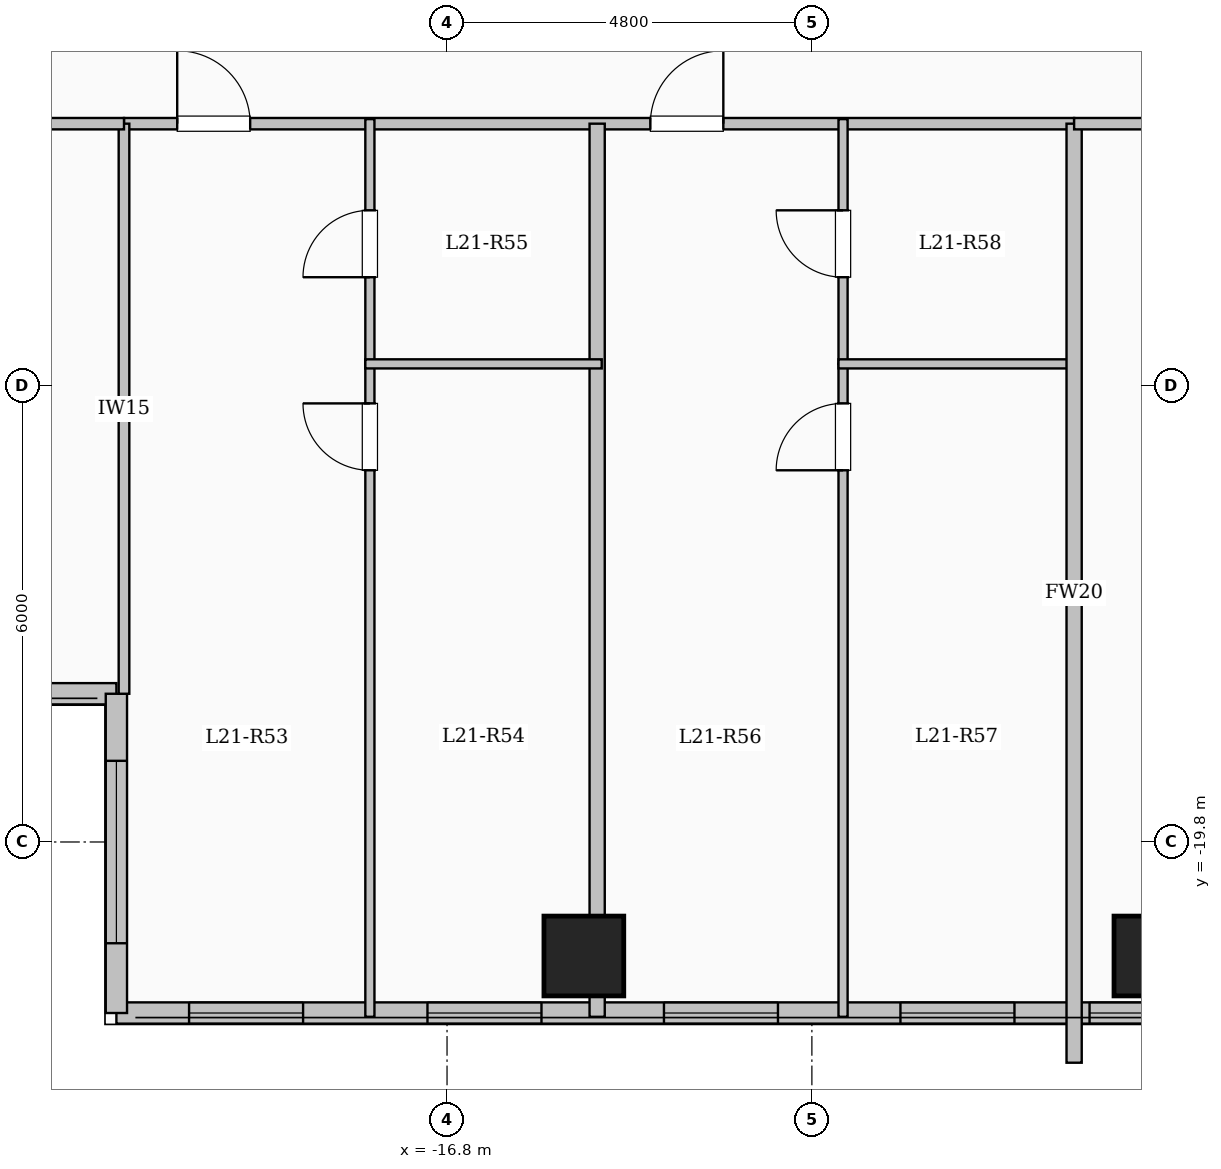
"""IFC4 building model, lengths in metres.
Left out: names, types, materials, properties, quantities, classifications, styles, units other than length and angle.
Written with IfcOpenShell. Run it as: python <this file> out.ifc"""

import sys

from ifc_helpers import new_model, si_unit, direction, frame, frame_2d, origin, origin_2d, place, context, subcontext, project, spatial, rectangle, extrude, element, fill, save


model = new_model("IFC4")
c1 = context("Model", 3, precision=1e-05, world=origin(), true_north=direction((0.0, 1.0)))
c2 = subcontext(c1, "Body", "Model", "MODEL_VIEW")
j1 = project(units=[si_unit("LENGTHUNIT", "METRE"), si_unit("PLANEANGLEUNIT", "RADIAN")], contexts=[c1])
p1 = place(None, origin())
s1 = spatial("IfcSite", under=j1, at=p1, CompositionType="ELEMENT")
p2 = place(p1, origin())
s2 = spatial("IfcBuilding", under=s1, at=p2, CompositionType="ELEMENT")
p3 = place(p2, frame((0.0, 0.0, 81.65)))
s3 = spatial("IfcBuildingStorey", under=s2, at=p3, CompositionType="ELEMENT", Elevation=81.65)
for number, where, z_axis, x_axis in (
    (1, (-15.0, -21.3, 0.0), (0.0, 0.0, 1.0), (1.0, 0.0, 0.0)),
    (2, (-7.5, -21.3, 0.0), (0.0, 0.0, 1.0), (1.0, 0.0, 0.0)),
):
    element("IfcColumn", number, at=place(p3, frame(where, z_axis=z_axis, x_axis=x_axis)), inside=s3, PredefinedType="COLUMN", context=c2, shape_type="SweptSolid", body=[
        extrude(rectangle(XDim=1.05, YDim=1.05, at=origin_2d()), origin(), (0.0, 0.0, 1.0), 3.35),
    ])
p4 = place(p3, frame((-21.15, -17.85, 0.0), z_axis=(0.0, 0.0, 1.0), x_axis=(-1.0, 0.0, 0.0)))
e3 = element("IfcWall", 3, at=p4, inside=s3, PredefinedType="SOLIDWALL", context=c2, shape_type="SweptSolid", body=[
    extrude(rectangle(XDim=5.7, YDim=0.28, at=frame_2d((2.85, 0.0))), origin(), (0.0, 0.0, 1.0), 3.1),
])
p5 = place(p4, frame((1.625, 0.0, 0.9)))
e4 = element("IfcOpeningElement", 4, at=p5, cuts=e3, PredefinedType="OPENING", context=c2, shape_type="SweptSolid", body=[
    extrude(rectangle(XDim=2.4, YDim=1.8, at=frame_2d((1.2, 0.9))), frame((0.0, 0.15, 0.0), z_axis=(0.0, -1.0, 0.0), x_axis=(1.0, 0.0, 0.0)), (0.0, 0.0, 1.0), 0.3),
])
p6 = place(p3, frame((-7.35, -22.05, 0.0), z_axis=(0.0, 0.0, 1.0), x_axis=(-1.0, 0.0, 0.0)))
e5 = element("IfcWall", 5, at=p6, inside=s3, PredefinedType="SOLIDWALL", context=c2, shape_type="SweptSolid", body=[
    extrude(rectangle(XDim=13.8, YDim=0.28, at=frame_2d((6.9, 0.0))), origin(), (0.0, 0.0, 1.0), 3.1),
])
p7 = place(p6, frame((0.147, 0.0, 0.95)))
e6 = element("IfcOpeningElement", 6, at=p7, cuts=e5, PredefinedType="OPENING", context=c2, shape_type="SweptSolid", body=[
    extrude(rectangle(XDim=0.85, YDim=1.5, at=frame_2d((0.425, 0.75))), frame((0.0, 0.15, 0.0), z_axis=(0.0, -1.0, 0.0), x_axis=(1.0, 0.0, 0.0)), (0.0, 0.0, 1.0), 0.3),
])
p8 = place(p6, frame((1.985, 0.0, 0.9)))
e7 = element("IfcOpeningElement", 7, at=p8, cuts=e5, PredefinedType="OPENING", context=c2, shape_type="SweptSolid", body=[
    extrude(rectangle(XDim=1.5, YDim=1.65, at=frame_2d((0.75, 0.825))), frame((0.0, 0.15, 0.0), z_axis=(0.0, -1.0, 0.0), x_axis=(1.0, 0.0, 0.0)), (0.0, 0.0, 1.0), 0.3),
])
p9 = place(p6, frame((5.096, 0.0, 0.9)))
e8 = element("IfcOpeningElement", 8, at=p9, cuts=e5, PredefinedType="OPENING", context=c2, shape_type="SweptSolid", body=[
    extrude(rectangle(XDim=1.5, YDim=1.65, at=frame_2d((0.75, 0.825))), frame((0.0, 0.15, 0.0), z_axis=(0.0, -1.0, 0.0), x_axis=(1.0, 0.0, 0.0)), (0.0, 0.0, 1.0), 0.3),
])
p10 = place(p6, frame((8.208, 0.0, 0.9)))
e9 = element("IfcOpeningElement", 9, at=p10, cuts=e5, PredefinedType="OPENING", context=c2, shape_type="SweptSolid", body=[
    extrude(rectangle(XDim=1.5, YDim=1.65, at=frame_2d((0.75, 0.825))), frame((0.0, 0.15, 0.0), z_axis=(0.0, -1.0, 0.0), x_axis=(1.0, 0.0, 0.0)), (0.0, 0.0, 1.0), 0.3),
])
p11 = place(p6, frame((11.344, 0.0, 0.9)))
e10 = element("IfcOpeningElement", 10, at=p11, cuts=e5, PredefinedType="OPENING", context=c2, shape_type="SweptSolid", body=[
    extrude(rectangle(XDim=1.5, YDim=1.65, at=frame_2d((0.75, 0.825))), frame((0.0, 0.15, 0.0), z_axis=(0.0, -1.0, 0.0), x_axis=(1.0, 0.0, 0.0)), (0.0, 0.0, 1.0), 0.3),
])
p12 = place(p3, frame((-21.15, -22.05, 0.0), z_axis=(0.0, 0.0, 1.0), x_axis=(0.0, 1.0, 0.0)))
e11 = element("IfcWall", 11, at=p12, inside=s3, PredefinedType="SOLIDWALL", context=c2, shape_type="SweptSolid", body=[
    extrude(rectangle(XDim=4.2, YDim=0.28, at=frame_2d((2.1, 0.0))), origin(), (0.0, 0.0, 1.0), 3.1),
])
p13 = place(p12, frame((0.918, 0.0, 0.9)))
e12 = element("IfcOpeningElement", 12, at=p13, cuts=e11, PredefinedType="OPENING", context=c2, shape_type="SweptSolid", body=[
    extrude(rectangle(XDim=2.4, YDim=1.8, at=frame_2d((1.2, 0.9))), frame((0.0, 0.15, 0.0), z_axis=(0.0, -1.0, 0.0), x_axis=(1.0, 0.0, 0.0)), (0.0, 0.0, 1.0), 0.3),
])
p14 = place(p3, frame((-21.05, -10.35, 0.0), z_axis=(0.0, 0.0, 1.0), x_axis=(1.0, 0.0, 0.0)))
e13 = element("IfcWall", 13, at=p14, inside=s3, PredefinedType="PARTITIONING", context=c2, shape_type="SweptSolid", body=[
    extrude(rectangle(XDim=12.5, YDim=0.15, at=frame_2d((6.25, 0.0))), origin(), (0.0, 0.0, 1.0), 3.1),
])
p15 = place(p14, frame((0.7, 0.0, 0.0)))
e14 = element("IfcOpeningElement", 14, at=p15, cuts=e13, PredefinedType="OPENING", context=c2, shape_type="SweptSolid", body=[
    extrude(rectangle(XDim=0.96, YDim=2.15, at=frame_2d((0.48, 1.075))), frame((0.0, 0.085, 0.0), z_axis=(0.0, -1.0, 0.0), x_axis=(1.0, 0.0, 0.0)), (0.0, 0.0, 1.0), 0.17),
])
p16 = place(p14, frame((6.925, 0.0, 0.0)))
e15 = element("IfcOpeningElement", 15, at=p16, cuts=e13, PredefinedType="OPENING", context=c2, shape_type="SweptSolid", body=[
    extrude(rectangle(XDim=0.96, YDim=2.15, at=frame_2d((0.48, 1.075))), frame((0.0, 0.085, 0.0), z_axis=(0.0, -1.0, 0.0), x_axis=(1.0, 0.0, 0.0)), (0.0, 0.0, 1.0), 0.17),
])
p17 = place(p3, frame((-14.825, -22.1, 0.0), z_axis=(0.0, 0.0, 1.0), x_axis=(0.0, 1.0, 0.0)))
e16 = element("IfcWall", 16, at=p17, inside=s3, PredefinedType="SOLIDWALL", context=c2, shape_type="SweptSolid", body=[
    extrude(rectangle(XDim=11.75, YDim=0.2, at=frame_2d((5.875, 0.0))), origin(), (0.0, 0.0, 1.0), 2.435),
])
p18 = place(p3, frame((-17.815, -22.1, 0.0), z_axis=(0.0, 0.0, 1.0), x_axis=(0.0, 1.0, 0.0)))
e17 = element("IfcWall", 17, at=p18, inside=s3, PredefinedType="PARTITIONING", context=c2, shape_type="SweptSolid", body=[
    extrude(rectangle(XDim=8.59, YDim=0.12, at=frame_2d((4.295, 0.0))), origin(), (0.0, 0.0, 1.0), 3.1),
])
p19 = place(p18, frame((7.19, 0.0, 0.0)))
e18 = element("IfcOpeningElement", 18, at=p19, cuts=e17, PredefinedType="OPENING", context=c2, shape_type="SweptSolid", body=[
    extrude(rectangle(XDim=0.88, YDim=2.1, at=frame_2d((0.44, 1.05))), frame((0.0, 0.07, 0.0), z_axis=(0.0, -1.0, 0.0), x_axis=(1.0, 0.0, 0.0)), (0.0, 0.0, 1.0), 0.14),
])
p20 = place(p3, frame((-17.815, -13.51, 0.0), z_axis=(0.0, 0.0, 1.0), x_axis=(0.0, 1.0, 0.0)))
e19 = element("IfcWall", 19, at=p20, inside=s3, PredefinedType="PARTITIONING", context=c2, shape_type="SweptSolid", body=[
    extrude(rectangle(XDim=3.22, YDim=0.12, at=frame_2d((1.61, 0.0))), origin(), (0.0, 0.0, 1.0), 3.1),
])
p21 = place(p20, frame((1.14, 0.0, 0.0)))
e20 = element("IfcOpeningElement", 20, at=p21, cuts=e19, PredefinedType="OPENING", context=c2, shape_type="SweptSolid", body=[
    extrude(rectangle(XDim=0.88, YDim=2.1, at=frame_2d((0.44, 1.05))), frame((0.0, 0.07, 0.0), z_axis=(0.0, -1.0, 0.0), x_axis=(1.0, 0.0, 0.0)), (0.0, 0.0, 1.0), 0.14),
])
p22 = place(p3, frame((-17.875, -13.51, 0.0), z_axis=(0.0, 0.0, 1.0), x_axis=(1.0, 0.0, 0.0)))
e21 = element("IfcWall", 21, at=p22, inside=s3, PredefinedType="PARTITIONING", context=c2, shape_type="SweptSolid", body=[
    extrude(rectangle(XDim=3.11, YDim=0.12, at=frame_2d((1.555, 0.0))), origin(), (0.0, 0.0, 1.0), 3.1),
])
p23 = place(p3, frame((-11.59, -22.1, 0.0), z_axis=(0.0, 0.0, 1.0), x_axis=(0.0, 1.0, 0.0)))
e22 = element("IfcWall", 22, at=p23, inside=s3, PredefinedType="PARTITIONING", context=c2, shape_type="SweptSolid", body=[
    extrude(rectangle(XDim=8.59, YDim=0.12, at=frame_2d((4.295, 0.0))), origin(), (0.0, 0.0, 1.0), 3.1),
])
p24 = place(p23, frame((7.19, 0.0, 0.0)))
e23 = element("IfcOpeningElement", 23, at=p24, cuts=e22, PredefinedType="OPENING", context=c2, shape_type="SweptSolid", body=[
    extrude(rectangle(XDim=0.88, YDim=2.1, at=frame_2d((0.44, 1.05))), frame((0.0, 0.07, 0.0), z_axis=(0.0, -1.0, 0.0), x_axis=(1.0, 0.0, 0.0)), (0.0, 0.0, 1.0), 0.14),
])
p25 = place(p3, frame((-11.59, -13.51, 0.0), z_axis=(0.0, 0.0, 1.0), x_axis=(0.0, 1.0, 0.0)))
e24 = element("IfcWall", 24, at=p25, inside=s3, PredefinedType="PARTITIONING", context=c2, shape_type="SweptSolid", body=[
    extrude(rectangle(XDim=3.22, YDim=0.12, at=frame_2d((1.61, 0.0))), origin(), (0.0, 0.0, 1.0), 3.1),
])
p26 = place(p25, frame((1.14, 0.0, 0.0)))
e25 = element("IfcOpeningElement", 25, at=p26, cuts=e24, PredefinedType="OPENING", context=c2, shape_type="SweptSolid", body=[
    extrude(rectangle(XDim=0.88, YDim=2.1, at=frame_2d((0.44, 1.05))), frame((0.0, 0.07, 0.0), z_axis=(0.0, -1.0, 0.0), x_axis=(1.0, 0.0, 0.0)), (0.0, 0.0, 1.0), 0.14),
])
p27 = place(p3, frame((-11.65, -13.51, 0.0), z_axis=(0.0, 0.0, 1.0), x_axis=(1.0, 0.0, 0.0)))
e26 = element("IfcWall", 26, at=p27, inside=s3, PredefinedType="PARTITIONING", context=c2, shape_type="SweptSolid", body=[
    extrude(rectangle(XDim=3.11, YDim=0.12, at=frame_2d((1.555, 0.0))), origin(), (0.0, 0.0, 1.0), 3.1),
])
p28 = place(p3, frame((-8.55, -22.704, 0.0), z_axis=(0.0, 0.0, 1.0), x_axis=(0.0, 1.0, 0.0)))
e27 = element("IfcWall", 27, at=p28, inside=s3, PredefinedType="SOLIDWALL", context=c2, shape_type="SweptSolid", body=[
    extrude(rectangle(XDim=12.354, YDim=0.2, at=frame_2d((6.177, 0.0))), origin(), (0.0, 0.0, 1.0), 3.1),
])
p29 = place(p3, frame((-8.55, -10.35, 0.0), z_axis=(0.0, 0.0, 1.0), x_axis=(1.0, 0.0, 0.0)))
e28 = element("IfcWall", 28, at=p29, inside=s3, PredefinedType="PARTITIONING", context=c2, shape_type="SweptSolid", body=[
    extrude(rectangle(XDim=17.1, YDim=0.15, at=frame_2d((8.55, 0.0))), origin(), (0.0, 0.0, 1.0), 3.1),
])
p30 = place(p29, frame((1.6, 0.0, 0.0)))
e29 = element("IfcOpeningElement", 29, at=p30, cuts=e28, PredefinedType="OPENING", context=c2, shape_type="SweptSolid", body=[
    extrude(rectangle(XDim=0.96, YDim=2.15, at=frame_2d((0.48, 1.075))), frame((0.0, 0.085, 0.0), z_axis=(0.0, -1.0, 0.0), x_axis=(1.0, 0.0, 0.0)), (0.0, 0.0, 1.0), 0.17),
])
p31 = place(p3, frame((-21.05, -17.85, 0.0), z_axis=(0.0, 0.0, 1.0), x_axis=(0.0, 1.0, 0.0)))
e30 = element("IfcWall", 30, at=p31, inside=s3, PredefinedType="PARTITIONING", context=c2, shape_type="SweptSolid", body=[
    extrude(rectangle(XDim=7.5, YDim=0.14, at=frame_2d((3.75, 0.0))), origin(), (0.0, 0.0, 1.0), 3.1),
])
p32 = place(p3, frame((-26.88, -10.35, 0.0), z_axis=(0.0, 0.0, 1.0), x_axis=(1.0, 0.0, 0.0)))
e31 = element("IfcWall", 31, at=p32, inside=s3, PredefinedType="PARTITIONING", context=c2, shape_type="SweptSolid", body=[
    extrude(rectangle(XDim=5.83, YDim=0.15, at=frame_2d((2.915, 0.0))), origin(), (0.0, 0.0, 1.0), 3.1),
])
p33 = place(p32, frame((2.44, 0.0, 0.0)))
e32 = element("IfcOpeningElement", 32, at=p33, cuts=e31, PredefinedType="OPENING", context=c2, shape_type="SweptSolid", body=[
    extrude(rectangle(XDim=0.95, YDim=2.15, at=frame_2d((0.475, 1.075))), frame((0.0, 0.085, 0.0), z_axis=(0.0, -1.0, 0.0), x_axis=(1.0, 0.0, 0.0)), (0.0, 0.0, 1.0), 0.17),
])
p34 = place(p7, origin())
e33 = element("IfcWindow", 33, at=p34, inside=s3, PartitioningType="SINGLE_PANEL", PredefinedType="WINDOW", context=c2, shape_type="SweptSolid", body=[
    extrude(rectangle(XDim=0.85, YDim=1.5, at=frame_2d((0.425, 0.75))), frame((0.0, 0.03, 0.0), z_axis=(0.0, -1.0, 0.0), x_axis=(1.0, 0.0, 0.0)), (0.0, 0.0, 1.0), 0.06),
])
fill(e6, e33)
p35 = place(p8, origin())
e34 = element("IfcWindow", 34, at=p35, inside=s3, PartitioningType="SINGLE_PANEL", PredefinedType="WINDOW", context=c2, shape_type="SweptSolid", body=[
    extrude(rectangle(XDim=1.5, YDim=1.65, at=frame_2d((0.75, 0.825))), frame((0.0, 0.03, 0.0), z_axis=(0.0, -1.0, 0.0), x_axis=(1.0, 0.0, 0.0)), (0.0, 0.0, 1.0), 0.06),
])
fill(e7, e34)
p36 = place(p9, origin())
e35 = element("IfcWindow", 35, at=p36, inside=s3, PartitioningType="SINGLE_PANEL", PredefinedType="WINDOW", context=c2, shape_type="SweptSolid", body=[
    extrude(rectangle(XDim=1.5, YDim=1.65, at=frame_2d((0.75, 0.825))), frame((0.0, 0.03, 0.0), z_axis=(0.0, -1.0, 0.0), x_axis=(1.0, 0.0, 0.0)), (0.0, 0.0, 1.0), 0.06),
])
fill(e8, e35)
p37 = place(p10, origin())
e36 = element("IfcWindow", 36, at=p37, inside=s3, PartitioningType="SINGLE_PANEL", PredefinedType="WINDOW", context=c2, shape_type="SweptSolid", body=[
    extrude(rectangle(XDim=1.5, YDim=1.65, at=frame_2d((0.75, 0.825))), frame((0.0, 0.03, 0.0), z_axis=(0.0, -1.0, 0.0), x_axis=(1.0, 0.0, 0.0)), (0.0, 0.0, 1.0), 0.06),
])
fill(e9, e36)
p38 = place(p11, origin())
e37 = element("IfcWindow", 37, at=p38, inside=s3, PartitioningType="SINGLE_PANEL", PredefinedType="WINDOW", context=c2, shape_type="SweptSolid", body=[
    extrude(rectangle(XDim=1.5, YDim=1.65, at=frame_2d((0.75, 0.825))), frame((0.0, 0.03, 0.0), z_axis=(0.0, -1.0, 0.0), x_axis=(1.0, 0.0, 0.0)), (0.0, 0.0, 1.0), 0.06),
])
fill(e10, e37)
p39 = place(p13, origin())
e38 = element("IfcWindow", 38, at=p39, inside=s3, PartitioningType="SINGLE_PANEL", PredefinedType="WINDOW", context=c2, shape_type="SweptSolid", body=[
    extrude(rectangle(XDim=2.4, YDim=1.8, at=frame_2d((1.2, 0.9))), frame((0.0, 0.03, 0.0), z_axis=(0.0, -1.0, 0.0), x_axis=(1.0, 0.0, 0.0)), (0.0, 0.0, 1.0), 0.06),
])
fill(e12, e38)
p40 = place(p15, origin())
e39 = element("IfcDoor", 39, at=p40, inside=s3, OperationType="SINGLE_SWING_LEFT", PredefinedType="DOOR", context=c2, shape_type="SweptSolid", body=[
    extrude(rectangle(XDim=0.96, YDim=2.15, at=frame_2d((0.48, 1.075))), frame((0.0, 0.025, 0.0), z_axis=(0.0, -1.0, 0.0), x_axis=(1.0, 0.0, 0.0)), (0.0, 0.0, 1.0), 0.05),
])
fill(e14, e39)
p41 = place(p19, origin())
e40 = element("IfcDoor", 40, at=p41, inside=s3, OperationType="SINGLE_SWING_RIGHT", PredefinedType="DOOR", context=c2, shape_type="SweptSolid", body=[
    extrude(rectangle(XDim=0.88, YDim=2.1, at=frame_2d((0.44, 1.05))), frame((0.0, 0.025, 0.0), z_axis=(0.0, -1.0, 0.0), x_axis=(1.0, 0.0, 0.0)), (0.0, 0.0, 1.0), 0.05),
])
fill(e18, e40)
p42 = place(p21, origin())
e41 = element("IfcDoor", 41, at=p42, inside=s3, OperationType="SINGLE_SWING_LEFT", PredefinedType="DOOR", context=c2, shape_type="SweptSolid", body=[
    extrude(rectangle(XDim=0.88, YDim=2.1, at=frame_2d((0.44, 1.05))), frame((0.0, 0.025, 0.0), z_axis=(0.0, -1.0, 0.0), x_axis=(1.0, 0.0, 0.0)), (0.0, 0.0, 1.0), 0.05),
])
fill(e20, e41)
p43 = place(p16, origin())
e42 = element("IfcDoor", 42, at=p43, inside=s3, OperationType="SINGLE_SWING_RIGHT", PredefinedType="DOOR", context=c2, shape_type="SweptSolid", body=[
    extrude(rectangle(XDim=0.96, YDim=2.15, at=frame_2d((0.48, 1.075))), frame((0.0, 0.025, 0.0), z_axis=(0.0, -1.0, 0.0), x_axis=(1.0, 0.0, 0.0)), (0.0, 0.0, 1.0), 0.05),
])
fill(e15, e42)
p44 = place(p24, origin())
e43 = element("IfcDoor", 43, at=p44, inside=s3, OperationType="SINGLE_SWING_LEFT", PredefinedType="DOOR", context=c2, shape_type="SweptSolid", body=[
    extrude(rectangle(XDim=0.88, YDim=2.1, at=frame_2d((0.44, 1.05))), frame((0.0, 0.025, 0.0), z_axis=(0.0, -1.0, 0.0), x_axis=(1.0, 0.0, 0.0)), (0.0, 0.0, 1.0), 0.05),
])
fill(e23, e43)
p45 = place(p26, origin())
e44 = element("IfcDoor", 44, at=p45, inside=s3, OperationType="SINGLE_SWING_RIGHT", PredefinedType="DOOR", context=c2, shape_type="SweptSolid", body=[
    extrude(rectangle(XDim=0.88, YDim=2.1, at=frame_2d((0.44, 1.05))), frame((0.0, 0.025, 0.0), z_axis=(0.0, -1.0, 0.0), x_axis=(1.0, 0.0, 0.0)), (0.0, 0.0, 1.0), 0.05),
])
fill(e25, e44)
save(model, sys.argv[1])
